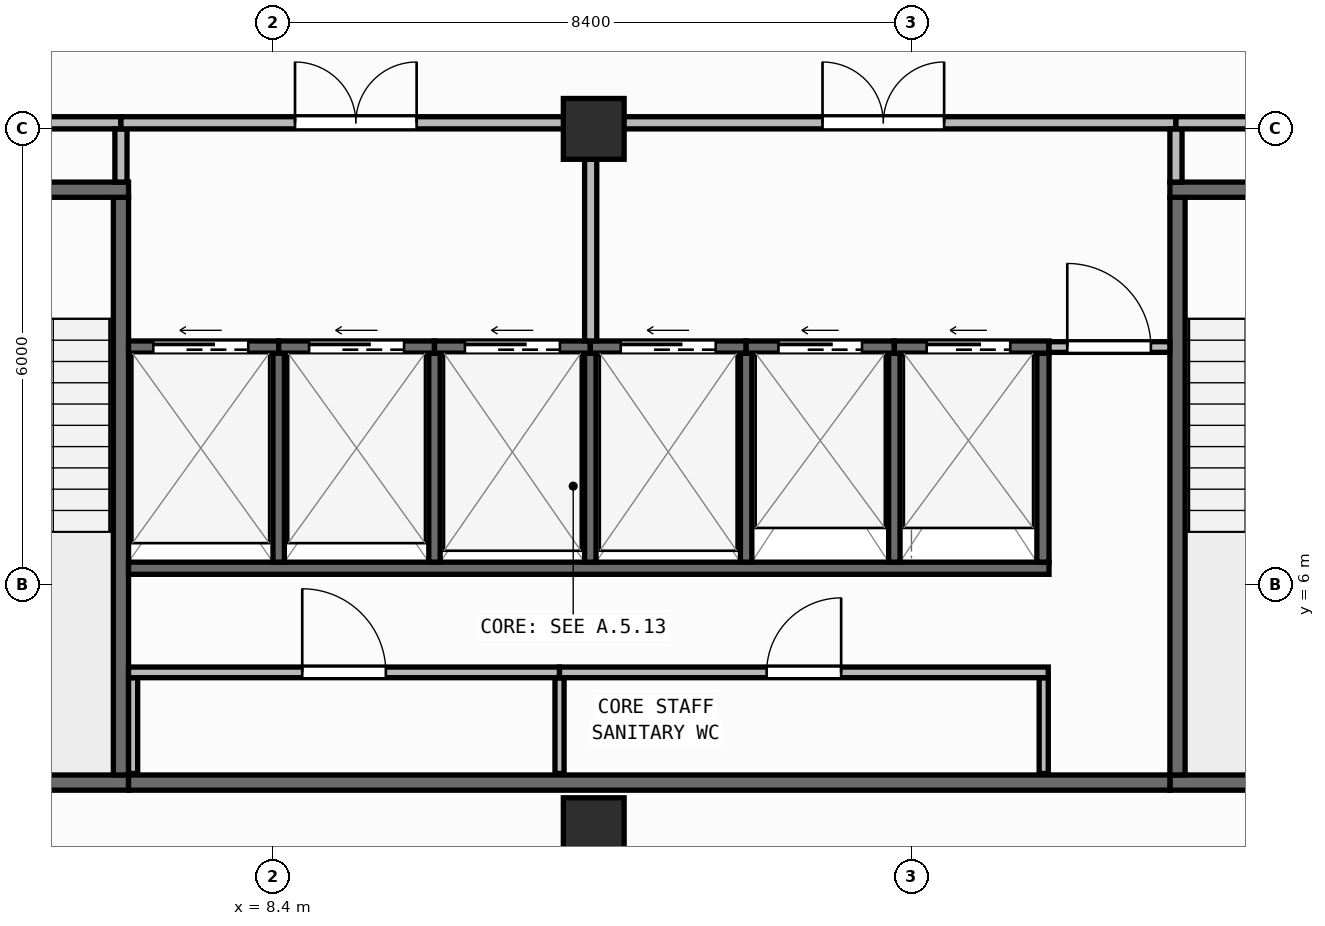
"""IFC4 building model, lengths in metres.
Left out: names, types, materials, properties, quantities, classifications, styles, units other than length and angle.
Written with IfcOpenShell. Run it as: python <this file> out.ifc"""

import sys

from ifc_helpers import new_model, si_unit, direction, frame, frame_2d, origin, origin_2d, place, context, subcontext, project, spatial, rectangle, extrude, element, fill, save


model = new_model("IFC4")
c1 = context("Model", 3, precision=1e-05, world=origin(), true_north=direction((0.0, 1.0)))
c2 = subcontext(c1, "Body", "Model", "MODEL_VIEW")
j1 = project(units=[si_unit("LENGTHUNIT", "METRE"), si_unit("PLANEANGLEUNIT", "RADIAN")], contexts=[c1])
p1 = place(None, origin())
s1 = spatial("IfcSite", under=j1, at=p1, CompositionType="ELEMENT")
p2 = place(p1, origin())
s2 = spatial("IfcBuilding", under=s1, at=p2, CompositionType="ELEMENT")
p3 = place(p2, frame((0.0, 0.0, 260.5)))
s3 = spatial("IfcBuildingStorey", under=s2, at=p3, CompositionType="ELEMENT", Elevation=260.5)
for number, where, z_axis, x_axis in (
    (1, (12.62, 2.8, 0.0), (0.0, 0.0, 1.0), (1.0, 0.0, 0.0)),
    (2, (12.62, 12.0, 0.0), (0.0, 0.0, 1.0), (1.0, 0.0, 0.0)),
):
    element("IfcColumn", number, at=place(p3, frame(where, z_axis=z_axis, x_axis=x_axis)), inside=s3, PredefinedType="COLUMN", context=c2, shape_type="SweptSolid", body=[
        extrude(rectangle(XDim=0.8, YDim=0.8, at=origin_2d()), origin(), (0.0, 0.0, 1.0), 3.95),
    ])
p4 = place(p3, frame((2.56, 0.173, 0.0), z_axis=(0.0, 0.0, 1.0), x_axis=(0.996798206282, 0.079958338856, 0.0)))
e3 = element("IfcWall", 3, at=p4, inside=s3, PredefinedType="STANDARD", context=c2, shape_type="SweptSolid", body=[
    extrude(rectangle(XDim=37.199, YDim=0.26, at=frame_2d((18.6, 0.0))), origin(), (0.0, 0.0, 1.0), 3.71),
])
p5 = place(p4, frame((17.4, 0.0, 0.9)))
e4 = element("IfcOpeningElement", 4, at=p5, cuts=e3, PredefinedType="OPENING", context=c2, shape_type="SweptSolid", body=[
    extrude(rectangle(XDim=2.4, YDim=1.65, at=frame_2d((1.2, 0.825))), frame((0.0, 0.14, 0.0), z_axis=(0.0, -1.0, 0.0), x_axis=(1.0, 0.0, 0.0)), (0.0, 0.0, 1.0), 0.28),
])
p6 = place(p3, frame((2.8, 3.4, 0.0), z_axis=(0.0, 0.0, 1.0), x_axis=(1.0, 0.0, 0.0)))
e5 = element("IfcWall", 5, at=p6, inside=s3, PredefinedType="SHEAR", context=c2, shape_type="SweptSolid", body=[
    extrude(rectangle(XDim=3.7, YDim=0.2, at=frame_2d((1.85, 0.0))), origin(), (0.0, 0.0, 1.0), 3.71),
])
p7 = place(p3, frame((6.4, 3.5, 0.0), z_axis=(0.0, 0.0, 1.0), x_axis=(0.0, 1.0, 0.0)))
e6 = element("IfcWall", 6, at=p7, inside=s3, PredefinedType="SHEAR", context=c2, shape_type="SweptSolid", body=[
    extrude(rectangle(XDim=7.6, YDim=0.2, at=frame_2d((3.8, 0.0))), origin(), (0.0, 0.0, 1.0), 3.71),
])
p8 = place(p3, frame((2.8, 11.2, 0.0), z_axis=(0.0, 0.0, 1.0), x_axis=(1.0, 0.0, 0.0)))
e7 = element("IfcWall", 7, at=p8, inside=s3, PredefinedType="SHEAR", context=c2, shape_type="SweptSolid", body=[
    extrude(rectangle(XDim=3.7, YDim=0.2, at=frame_2d((1.85, 0.0))), origin(), (0.0, 0.0, 1.0), 3.71),
])
p9 = place(p8, frame((1.2, 0.0, 0.0)))
e8 = element("IfcOpeningElement", 8, at=p9, cuts=e7, PredefinedType="OPENING", context=c2, shape_type="SweptSolid", body=[
    extrude(rectangle(XDim=1.3, YDim=2.15, at=frame_2d((0.65, 1.075))), frame((0.0, 0.11, 0.0), z_axis=(0.0, -1.0, 0.0), x_axis=(1.0, 0.0, 0.0)), (0.0, 0.0, 1.0), 0.22),
])
p10 = place(p3, frame((20.2, 3.4, 0.0), z_axis=(0.0, 0.0, 1.0), x_axis=(1.0, 0.0, 0.0)))
e9 = element("IfcWall", 9, at=p10, inside=s3, PredefinedType="SHEAR", context=c2, shape_type="SweptSolid", body=[
    extrude(rectangle(XDim=3.7, YDim=0.2, at=frame_2d((1.85, 0.0))), origin(), (0.0, 0.0, 1.0), 3.71),
])
p11 = place(p3, frame((20.3, 3.5, 0.0), z_axis=(0.0, 0.0, 1.0), x_axis=(0.0, 1.0, 0.0)))
e10 = element("IfcWall", 10, at=p11, inside=s3, PredefinedType="SHEAR", context=c2, shape_type="SweptSolid", body=[
    extrude(rectangle(XDim=7.6, YDim=0.2, at=frame_2d((3.8, 0.0))), origin(), (0.0, 0.0, 1.0), 3.71),
])
p12 = place(p3, frame((20.2, 11.2, 0.0), z_axis=(0.0, 0.0, 1.0), x_axis=(1.0, 0.0, 0.0)))
e11 = element("IfcWall", 11, at=p12, inside=s3, PredefinedType="SHEAR", context=c2, shape_type="SweptSolid", body=[
    extrude(rectangle(XDim=3.7, YDim=0.2, at=frame_2d((1.85, 0.0))), origin(), (0.0, 0.0, 1.0), 3.71),
])
p13 = place(p12, frame((1.2, 0.0, 0.0)))
e12 = element("IfcOpeningElement", 12, at=p13, cuts=e11, PredefinedType="OPENING", context=c2, shape_type="SweptSolid", body=[
    extrude(rectangle(XDim=1.3, YDim=2.15, at=frame_2d((0.65, 1.075))), frame((0.0, 0.11, 0.0), z_axis=(0.0, -1.0, 0.0), x_axis=(1.0, 0.0, 0.0)), (0.0, 0.0, 1.0), 0.22),
])
p14 = place(p3, frame((6.5, 3.4, 0.0), z_axis=(0.0, 0.0, 1.0), x_axis=(1.0, 0.0, 0.0)))
e13 = element("IfcWall", 13, at=p14, inside=s3, PredefinedType="SHEAR", context=c2, shape_type="SweptSolid", body=[
    extrude(rectangle(XDim=13.7, YDim=0.2, at=frame_2d((6.85, 0.0))), origin(), (0.0, 0.0, 1.0), 3.71),
])
p15 = place(p3, frame((6.5, 6.22, 0.0), z_axis=(0.0, 0.0, 1.0), x_axis=(1.0, 0.0, 0.0)))
e14 = element("IfcWall", 14, at=p15, inside=s3, PredefinedType="SHEAR", context=c2, shape_type="SweptSolid", body=[
    extrude(rectangle(XDim=12.11, YDim=0.16, at=frame_2d((6.055, 0.0))), origin(), (0.0, 0.0, 1.0), 3.71),
])
p16 = place(p3, frame((18.53, 6.3, 0.0), z_axis=(0.0, 0.0, 1.0), x_axis=(0.0, 1.0, 0.0)))
e15 = element("IfcWall", 15, at=p16, inside=s3, PredefinedType="SHEAR", context=c2, shape_type="SweptSolid", body=[
    extrude(rectangle(XDim=2.75, YDim=0.16, at=frame_2d((1.375, 0.0))), origin(), (0.0, 0.0, 1.0), 3.71),
])
for number, where, z_axis, x_axis in (
    (16, (8.475, 6.3, 0.0), (0.0, 0.0, 1.0), (0.0, 1.0, 0.0)),
    (17, (10.525, 6.3, 0.0), (0.0, 0.0, 1.0), (0.0, 1.0, 0.0)),
    (18, (12.575, 6.3, 0.0), (0.0, 0.0, 1.0), (0.0, 1.0, 0.0)),
    (19, (14.625, 6.3, 0.0), (0.0, 0.0, 1.0), (0.0, 1.0, 0.0)),
    (20, (16.575, 6.3, 0.0), (0.0, 0.0, 1.0), (0.0, 1.0, 0.0)),
):
    element("IfcWall", number, at=place(p3, frame(where, z_axis=z_axis, x_axis=x_axis)), inside=s3, PredefinedType="SHEAR", context=c2, shape_type="SweptSolid", body=[
        extrude(rectangle(XDim=2.75, YDim=0.15, at=frame_2d((1.375, 0.0))), origin(), (0.0, 0.0, 1.0), 3.71),
    ])
p17 = place(p3, frame((6.5, 9.13, 0.0), z_axis=(0.0, 0.0, 1.0), x_axis=(1.0, 0.0, 0.0)))
e21 = element("IfcWall", 21, at=p17, inside=s3, PredefinedType="SHEAR", context=c2, shape_type="SweptSolid", body=[
    extrude(rectangle(XDim=1.975, YDim=0.16, at=frame_2d((0.988, 0.0))), origin(), (0.0, 0.0, 1.0), 3.71),
])
p18 = place(p17, frame((0.325, 0.0, 0.0)))
e22 = element("IfcOpeningElement", 22, at=p18, cuts=e21, PredefinedType="OPENING", context=c2, shape_type="SweptSolid", body=[
    extrude(rectangle(XDim=1.25, YDim=2.15, at=frame_2d((0.625, 1.075))), frame((0.0, 0.09, 0.0), z_axis=(0.0, -1.0, 0.0), x_axis=(1.0, 0.0, 0.0)), (0.0, 0.0, 1.0), 0.18),
])
p19 = place(p3, frame((8.475, 9.13, 0.0), z_axis=(0.0, 0.0, 1.0), x_axis=(1.0, 0.0, 0.0)))
e23 = element("IfcWall", 23, at=p19, inside=s3, PredefinedType="SHEAR", context=c2, shape_type="SweptSolid", body=[
    extrude(rectangle(XDim=2.05, YDim=0.16, at=frame_2d((1.025, 0.0))), origin(), (0.0, 0.0, 1.0), 3.71),
])
p20 = place(p19, frame((0.4, 0.0, 0.0)))
e24 = element("IfcOpeningElement", 24, at=p20, cuts=e23, PredefinedType="OPENING", context=c2, shape_type="SweptSolid", body=[
    extrude(rectangle(XDim=1.25, YDim=2.15, at=frame_2d((0.625, 1.075))), frame((0.0, 0.09, 0.0), z_axis=(0.0, -1.0, 0.0), x_axis=(1.0, 0.0, 0.0)), (0.0, 0.0, 1.0), 0.18),
])
p21 = place(p3, frame((10.525, 9.13, 0.0), z_axis=(0.0, 0.0, 1.0), x_axis=(1.0, 0.0, 0.0)))
e25 = element("IfcWall", 25, at=p21, inside=s3, PredefinedType="SHEAR", context=c2, shape_type="SweptSolid", body=[
    extrude(rectangle(XDim=2.05, YDim=0.16, at=frame_2d((1.025, 0.0))), origin(), (0.0, 0.0, 1.0), 3.71),
])
p22 = place(p21, frame((0.4, 0.0, 0.0)))
e26 = element("IfcOpeningElement", 26, at=p22, cuts=e25, PredefinedType="OPENING", context=c2, shape_type="SweptSolid", body=[
    extrude(rectangle(XDim=1.25, YDim=2.15, at=frame_2d((0.625, 1.075))), frame((0.0, 0.09, 0.0), z_axis=(0.0, -1.0, 0.0), x_axis=(1.0, 0.0, 0.0)), (0.0, 0.0, 1.0), 0.18),
])
p23 = place(p3, frame((12.575, 9.13, 0.0), z_axis=(0.0, 0.0, 1.0), x_axis=(1.0, 0.0, 0.0)))
e27 = element("IfcWall", 27, at=p23, inside=s3, PredefinedType="SHEAR", context=c2, shape_type="SweptSolid", body=[
    extrude(rectangle(XDim=2.05, YDim=0.16, at=frame_2d((1.025, 0.0))), origin(), (0.0, 0.0, 1.0), 3.71),
])
p24 = place(p23, frame((0.4, 0.0, 0.0)))
e28 = element("IfcOpeningElement", 28, at=p24, cuts=e27, PredefinedType="OPENING", context=c2, shape_type="SweptSolid", body=[
    extrude(rectangle(XDim=1.25, YDim=2.15, at=frame_2d((0.625, 1.075))), frame((0.0, 0.09, 0.0), z_axis=(0.0, -1.0, 0.0), x_axis=(1.0, 0.0, 0.0)), (0.0, 0.0, 1.0), 0.18),
])
p25 = place(p3, frame((14.625, 9.13, 0.0), z_axis=(0.0, 0.0, 1.0), x_axis=(1.0, 0.0, 0.0)))
e29 = element("IfcWall", 29, at=p25, inside=s3, PredefinedType="SHEAR", context=c2, shape_type="SweptSolid", body=[
    extrude(rectangle(XDim=1.95, YDim=0.16, at=frame_2d((0.975, 0.0))), origin(), (0.0, 0.0, 1.0), 3.71),
])
p26 = place(p25, frame((0.425, 0.0, 0.0)))
e30 = element("IfcOpeningElement", 30, at=p26, cuts=e29, PredefinedType="OPENING", context=c2, shape_type="SweptSolid", body=[
    extrude(rectangle(XDim=1.1, YDim=2.15, at=frame_2d((0.55, 1.075))), frame((0.0, 0.09, 0.0), z_axis=(0.0, -1.0, 0.0), x_axis=(1.0, 0.0, 0.0)), (0.0, 0.0, 1.0), 0.18),
])
p27 = place(p3, frame((16.575, 9.13, 0.0), z_axis=(0.0, 0.0, 1.0), x_axis=(1.0, 0.0, 0.0)))
e31 = element("IfcWall", 31, at=p27, inside=s3, PredefinedType="SHEAR", context=c2, shape_type="SweptSolid", body=[
    extrude(rectangle(XDim=2.035, YDim=0.16, at=frame_2d((1.018, 0.0))), origin(), (0.0, 0.0, 1.0), 3.71),
])
p28 = place(p27, frame((0.425, 0.0, 0.0)))
e32 = element("IfcOpeningElement", 32, at=p28, cuts=e31, PredefinedType="OPENING", context=c2, shape_type="SweptSolid", body=[
    extrude(rectangle(XDim=1.1, YDim=2.15, at=frame_2d((0.55, 1.075))), frame((0.0, 0.09, 0.0), z_axis=(0.0, -1.0, 0.0), x_axis=(1.0, 0.0, 0.0)), (0.0, 0.0, 1.0), 0.18),
])
for number, where, z_axis, x_axis in (
    (33, (6.56, 3.52, 0.0), (0.0, 0.0, 1.0), (0.0, 1.0, 0.0)),
    (34, (12.17, 3.52, 0.0), (0.0, 0.0, 1.0), (0.0, 1.0, 0.0)),
    (35, (18.54, 3.52, 0.0), (0.0, 0.0, 1.0), (0.0, 1.0, 0.0)),
):
    element("IfcWall", number, at=place(p3, frame(where, z_axis=z_axis, x_axis=x_axis)), inside=s3, PredefinedType="PARTITIONING", context=c2, shape_type="SweptSolid", body=[
        extrude(rectangle(XDim=1.26, YDim=0.12, at=frame_2d((0.63, 0.0))), origin(), (0.0, 0.0, 1.0), 3.71),
    ])
p29 = place(p3, frame((6.5, 4.85, 0.0), z_axis=(0.0, 0.0, 1.0), x_axis=(1.0, 0.0, 0.0)))
e36 = element("IfcWall", 36, at=p29, inside=s3, PredefinedType="PARTITIONING", context=c2, shape_type="SweptSolid", body=[
    extrude(rectangle(XDim=5.67, YDim=0.14, at=frame_2d((2.835, 0.0))), origin(), (0.0, 0.0, 1.0), 3.71),
])
p30 = place(p29, frame((2.285, 0.0, 0.0)))
e37 = element("IfcOpeningElement", 37, at=p30, cuts=e36, PredefinedType="OPENING", context=c2, shape_type="SweptSolid", body=[
    extrude(rectangle(XDim=1.1, YDim=2.1, at=frame_2d((0.55, 1.05))), frame((0.0, 0.08, 0.0), z_axis=(0.0, -1.0, 0.0), x_axis=(1.0, 0.0, 0.0)), (0.0, 0.0, 1.0), 0.16),
])
p31 = place(p3, frame((12.17, 4.85, 0.0), z_axis=(0.0, 0.0, 1.0), x_axis=(1.0, 0.0, 0.0)))
e38 = element("IfcWall", 38, at=p31, inside=s3, PredefinedType="PARTITIONING", context=c2, shape_type="SweptSolid", body=[
    extrude(rectangle(XDim=6.43, YDim=0.14, at=frame_2d((3.215, 0.0))), origin(), (0.0, 0.0, 1.0), 3.71),
])
p32 = place(p31, frame((2.725, 0.0, 0.0)))
e39 = element("IfcOpeningElement", 39, at=p32, cuts=e38, PredefinedType="OPENING", context=c2, shape_type="SweptSolid", body=[
    extrude(rectangle(XDim=0.98, YDim=2.1, at=frame_2d((0.49, 1.05))), frame((0.0, 0.08, 0.0), z_axis=(0.0, -1.0, 0.0), x_axis=(1.0, 0.0, 0.0)), (0.0, 0.0, 1.0), 0.16),
])
p33 = place(p3, frame((18.61, 9.13, 0.0), z_axis=(0.0, 0.0, 1.0), x_axis=(1.0, 0.0, 0.0)))
e40 = element("IfcWall", 40, at=p33, inside=s3, PredefinedType="PARTITIONING", context=c2, shape_type="SweptSolid", body=[
    extrude(rectangle(XDim=1.59, YDim=0.14, at=frame_2d((0.795, 0.0))), origin(), (0.0, 0.0, 1.0), 3.71),
])
p34 = place(p33, frame((0.24, 0.0, 0.0)))
e41 = element("IfcOpeningElement", 41, at=p34, cuts=e40, PredefinedType="OPENING", context=c2, shape_type="SweptSolid", body=[
    extrude(rectangle(XDim=1.1, YDim=2.1, at=frame_2d((0.55, 1.05))), frame((0.0, 0.08, 0.0), z_axis=(0.0, -1.0, 0.0), x_axis=(1.0, 0.0, 0.0)), (0.0, 0.0, 1.0), 0.16),
])
p35 = place(p3, frame((2.8, 12.08, 0.0), z_axis=(0.0, 0.0, 1.0), x_axis=(1.0, 0.0, 0.0)))
e42 = element("IfcWall", 42, at=p35, inside=s3, PredefinedType="PARTITIONING", context=c2, shape_type="SweptSolid", body=[
    extrude(rectangle(XDim=3.6, YDim=0.16, at=frame_2d((1.8, 0.0))), origin(), (0.0, 0.0, 1.0), 3.157),
])
p36 = place(p35, frame((1.0, 0.0, 0.0)))
e43 = element("IfcOpeningElement", 43, at=p36, cuts=e42, PredefinedType="OPENING", context=c2, shape_type="SweptSolid", body=[
    extrude(rectangle(XDim=1.6, YDim=2.05, at=frame_2d((0.8, 1.025))), frame((0.0, 0.09, 0.0), z_axis=(0.0, -1.0, 0.0), x_axis=(1.0, 0.0, 0.0)), (0.0, 0.0, 1.0), 0.18),
])
p37 = place(p3, frame((6.4, 11.3, 0.0), z_axis=(0.0, 0.0, 1.0), x_axis=(0.0, 1.0, 0.0)))
e44 = element("IfcWall", 44, at=p37, inside=s3, PredefinedType="PARTITIONING", context=c2, shape_type="SweptSolid", body=[
    extrude(rectangle(XDim=0.7, YDim=0.16, at=frame_2d((0.35, 0.0))), origin(), (0.0, 0.0, 1.0), 3.71),
])
p38 = place(p3, frame((6.4, 12.08, 0.0), z_axis=(0.0, 0.0, 1.0), x_axis=(1.0, 0.0, 0.0)))
e45 = element("IfcWall", 45, at=p38, inside=s3, PredefinedType="PARTITIONING", context=c2, shape_type="SweptSolid", body=[
    extrude(rectangle(XDim=6.18, YDim=0.16, at=frame_2d((3.09, 0.0))), origin(), (0.0, 0.0, 1.0), 3.157),
])
p39 = place(p38, frame((2.29, 0.0, 0.0)))
e46 = element("IfcOpeningElement", 46, at=p39, cuts=e45, PredefinedType="OPENING", context=c2, shape_type="SweptSolid", body=[
    extrude(rectangle(XDim=1.6, YDim=2.05, at=frame_2d((0.8, 1.025))), frame((0.0, 0.09, 0.0), z_axis=(0.0, -1.0, 0.0), x_axis=(1.0, 0.0, 0.0)), (0.0, 0.0, 1.0), 0.18),
])
p40 = place(p3, frame((12.58, 9.21, 0.0), z_axis=(0.0, 0.0, 1.0), x_axis=(0.0, 1.0, 0.0)))
e47 = element("IfcWall", 47, at=p40, inside=s3, PredefinedType="PARTITIONING", context=c2, shape_type="SweptSolid", body=[
    extrude(rectangle(XDim=2.79, YDim=0.16, at=frame_2d((1.395, 0.0))), origin(), (0.0, 0.0, 1.0), 3.71),
])
p41 = place(p3, frame((12.58, 12.08, 0.0), z_axis=(0.0, 0.0, 1.0), x_axis=(1.0, 0.0, 0.0)))
e48 = element("IfcWall", 48, at=p41, inside=s3, PredefinedType="PARTITIONING", context=c2, shape_type="SweptSolid", body=[
    extrude(rectangle(XDim=7.7, YDim=0.16, at=frame_2d((3.85, 0.0))), origin(), (0.0, 0.0, 1.0), 3.157),
])
p42 = place(p41, frame((3.05, 0.0, 0.0)))
e49 = element("IfcOpeningElement", 49, at=p42, cuts=e48, PredefinedType="OPENING", context=c2, shape_type="SweptSolid", body=[
    extrude(rectangle(XDim=1.6, YDim=2.05, at=frame_2d((0.8, 1.025))), frame((0.0, 0.09, 0.0), z_axis=(0.0, -1.0, 0.0), x_axis=(1.0, 0.0, 0.0)), (0.0, 0.0, 1.0), 0.18),
])
p43 = place(p3, frame((20.28, 11.3, 0.0), z_axis=(0.0, 0.0, 1.0), x_axis=(0.0, 1.0, 0.0)))
e50 = element("IfcWall", 50, at=p43, inside=s3, PredefinedType="PARTITIONING", context=c2, shape_type="SweptSolid", body=[
    extrude(rectangle(XDim=0.7, YDim=0.16, at=frame_2d((0.35, 0.0))), origin(), (0.0, 0.0, 1.0), 3.71),
])
p44 = place(p3, frame((20.28, 12.08, 0.0), z_axis=(0.0, 0.0, 1.0), x_axis=(1.0, 0.0, 0.0)))
e51 = element("IfcWall", 51, at=p44, inside=s3, PredefinedType="PARTITIONING", context=c2, shape_type="SweptSolid", body=[
    extrude(rectangle(XDim=3.62, YDim=0.16, at=frame_2d((1.81, 0.0))), origin(), (0.0, 0.0, 1.0), 3.157),
])
p45 = place(p44, frame((1.01, 0.0, 0.0)))
e52 = element("IfcOpeningElement", 52, at=p45, cuts=e51, PredefinedType="OPENING", context=c2, shape_type="SweptSolid", body=[
    extrude(rectangle(XDim=1.6, YDim=2.05, at=frame_2d((0.8, 1.025))), frame((0.0, 0.09, 0.0), z_axis=(0.0, -1.0, 0.0), x_axis=(1.0, 0.0, 0.0)), (0.0, 0.0, 1.0), 0.18),
])
p46 = place(p18, origin())
e53 = element("IfcDoor", 53, at=p46, inside=s3, OperationType="SLIDING_TO_LEFT", PredefinedType="DOOR", context=c2, shape_type="SweptSolid", body=[
    extrude(rectangle(XDim=1.25, YDim=2.15, at=frame_2d((0.625, 1.075))), frame((0.0, 0.025, 0.0), z_axis=(0.0, -1.0, 0.0), x_axis=(1.0, 0.0, 0.0)), (0.0, 0.0, 1.0), 0.05),
])
fill(e22, e53)
p47 = place(p20, origin())
e54 = element("IfcDoor", 54, at=p47, inside=s3, OperationType="SLIDING_TO_LEFT", PredefinedType="DOOR", context=c2, shape_type="SweptSolid", body=[
    extrude(rectangle(XDim=1.25, YDim=2.15, at=frame_2d((0.625, 1.075))), frame((0.0, 0.025, 0.0), z_axis=(0.0, -1.0, 0.0), x_axis=(1.0, 0.0, 0.0)), (0.0, 0.0, 1.0), 0.05),
])
fill(e24, e54)
p48 = place(p22, origin())
e55 = element("IfcDoor", 55, at=p48, inside=s3, OperationType="SLIDING_TO_LEFT", PredefinedType="DOOR", context=c2, shape_type="SweptSolid", body=[
    extrude(rectangle(XDim=1.25, YDim=2.15, at=frame_2d((0.625, 1.075))), frame((0.0, 0.025, 0.0), z_axis=(0.0, -1.0, 0.0), x_axis=(1.0, 0.0, 0.0)), (0.0, 0.0, 1.0), 0.05),
])
fill(e26, e55)
p49 = place(p24, origin())
e56 = element("IfcDoor", 56, at=p49, inside=s3, OperationType="SLIDING_TO_LEFT", PredefinedType="DOOR", context=c2, shape_type="SweptSolid", body=[
    extrude(rectangle(XDim=1.25, YDim=2.15, at=frame_2d((0.625, 1.075))), frame((0.0, 0.025, 0.0), z_axis=(0.0, -1.0, 0.0), x_axis=(1.0, 0.0, 0.0)), (0.0, 0.0, 1.0), 0.05),
])
fill(e28, e56)
p50 = place(p26, origin())
e57 = element("IfcDoor", 57, at=p50, inside=s3, OperationType="SLIDING_TO_LEFT", PredefinedType="DOOR", context=c2, shape_type="SweptSolid", body=[
    extrude(rectangle(XDim=1.1, YDim=2.15, at=frame_2d((0.55, 1.075))), frame((0.0, 0.025, 0.0), z_axis=(0.0, -1.0, 0.0), x_axis=(1.0, 0.0, 0.0)), (0.0, 0.0, 1.0), 0.05),
])
fill(e30, e57)
p51 = place(p28, origin())
e58 = element("IfcDoor", 58, at=p51, inside=s3, OperationType="SLIDING_TO_LEFT", PredefinedType="DOOR", context=c2, shape_type="SweptSolid", body=[
    extrude(rectangle(XDim=1.1, YDim=2.15, at=frame_2d((0.55, 1.075))), frame((0.0, 0.025, 0.0), z_axis=(0.0, -1.0, 0.0), x_axis=(1.0, 0.0, 0.0)), (0.0, 0.0, 1.0), 0.05),
])
fill(e32, e58)
p52 = place(p30, origin())
e59 = element("IfcDoor", 59, at=p52, inside=s3, OperationType="SINGLE_SWING_LEFT", PredefinedType="DOOR", context=c2, shape_type="SweptSolid", body=[
    extrude(rectangle(XDim=1.1, YDim=2.1, at=frame_2d((0.55, 1.05))), frame((0.0, 0.025, 0.0), z_axis=(0.0, -1.0, 0.0), x_axis=(1.0, 0.0, 0.0)), (0.0, 0.0, 1.0), 0.05),
])
fill(e37, e59)
p53 = place(p32, origin())
e60 = element("IfcDoor", 60, at=p53, inside=s3, OperationType="SINGLE_SWING_RIGHT", PredefinedType="DOOR", context=c2, shape_type="SweptSolid", body=[
    extrude(rectangle(XDim=0.98, YDim=2.1, at=frame_2d((0.49, 1.05))), frame((0.0, 0.025, 0.0), z_axis=(0.0, -1.0, 0.0), x_axis=(1.0, 0.0, 0.0)), (0.0, 0.0, 1.0), 0.05),
])
fill(e39, e60)
p54 = place(p34, origin())
e61 = element("IfcDoor", 61, at=p54, inside=s3, OperationType="SINGLE_SWING_LEFT", PredefinedType="DOOR", context=c2, shape_type="SweptSolid", body=[
    extrude(rectangle(XDim=1.1, YDim=2.1, at=frame_2d((0.55, 1.05))), frame((0.0, 0.025, 0.0), z_axis=(0.0, -1.0, 0.0), x_axis=(1.0, 0.0, 0.0)), (0.0, 0.0, 1.0), 0.05),
])
fill(e41, e61)
p55 = place(p39, origin())
e62 = element("IfcDoor", 62, at=p55, inside=s3, OperationType="DOUBLE_DOOR_SINGLE_SWING", PredefinedType="DOOR", context=c2, shape_type="SweptSolid", body=[
    extrude(rectangle(XDim=1.6, YDim=2.05, at=frame_2d((0.8, 1.025))), frame((0.0, 0.025, 0.0), z_axis=(0.0, -1.0, 0.0), x_axis=(1.0, 0.0, 0.0)), (0.0, 0.0, 1.0), 0.05),
])
fill(e46, e62)
p56 = place(p42, origin())
e63 = element("IfcDoor", 63, at=p56, inside=s3, OperationType="DOUBLE_DOOR_SINGLE_SWING", PredefinedType="DOOR", context=c2, shape_type="SweptSolid", body=[
    extrude(rectangle(XDim=1.6, YDim=2.05, at=frame_2d((0.8, 1.025))), frame((0.0, 0.025, 0.0), z_axis=(0.0, -1.0, 0.0), x_axis=(1.0, 0.0, 0.0)), (0.0, 0.0, 1.0), 0.05),
])
fill(e49, e63)
save(model, sys.argv[1])
